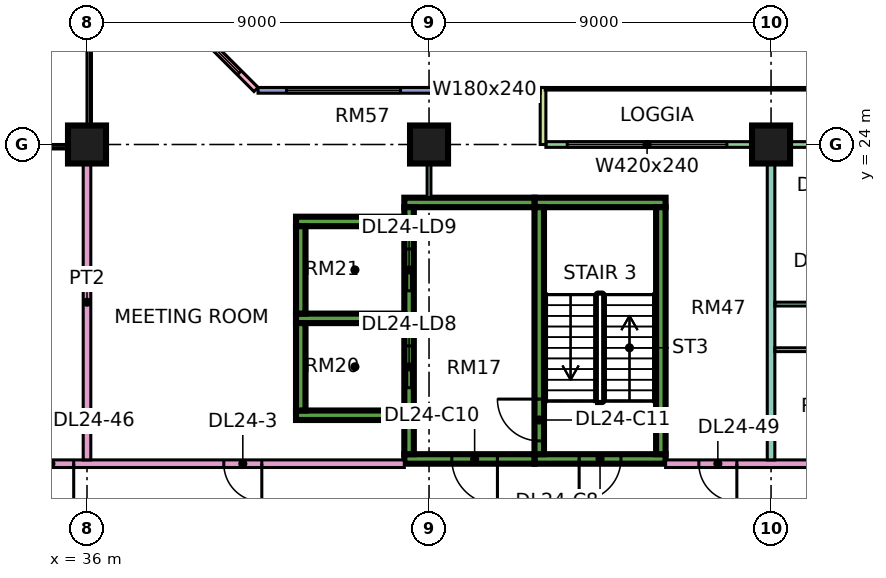
"""IFC4 building model, lengths in metres.
Left out: names, types, materials, properties, quantities, classifications, styles, units other than length and angle.
Written with IfcOpenShell. Run it as: python <this file> out.ifc"""

import sys

from ifc_helpers import new_model, si_unit, direction, frame, frame_2d, origin, origin_2d, place, context, subcontext, project, spatial, rectangle, extrude, element, fill, save


model = new_model("IFC4")
c1 = context("Model", 3, precision=1e-05, world=origin(), true_north=direction((0.0, 1.0)))
c2 = subcontext(c1, "Body", "Model", "MODEL_VIEW")
j1 = project(units=[si_unit("LENGTHUNIT", "METRE"), si_unit("PLANEANGLEUNIT", "RADIAN")], contexts=[c1])
p1 = place(None, origin())
s1 = spatial("IfcSite", under=j1, at=p1, CompositionType="ELEMENT")
p2 = place(p1, origin())
s2 = spatial("IfcBuilding", under=s1, at=p2, CompositionType="ELEMENT")
p3 = place(p2, frame((0.0, 0.0, 106.9)))
s3 = spatial("IfcBuildingStorey", under=s2, at=p3, CompositionType="ELEMENT", Elevation=106.9)
for number, where, z_axis, x_axis in (
    (1, (36.0, 24.0, 0.0), (0.0, 0.0, 1.0), (1.0, 0.0, 0.0)),
    (2, (45.0, 24.0, 0.0), (0.0, 0.0, 1.0), (1.0, 0.0, 0.0)),
    (3, (54.0, 24.0, 0.0), (0.0, 0.0, 1.0), (1.0, 0.0, 0.0)),
):
    element("IfcColumn", number, at=place(p3, frame(where, z_axis=z_axis, x_axis=x_axis)), inside=s3, PredefinedType="COLUMN", context=c2, shape_type="SweptSolid", body=[
        extrude(rectangle(XDim=1.0, YDim=1.0, at=origin_2d()), origin(), (0.0, 0.0, 1.0), 3.75),
    ])
p4 = place(p3, frame((47.775, 15.725, 0.0), z_axis=(0.0, 0.0, 1.0), x_axis=(1.0, 0.0, 0.0)))
e4 = element("IfcWall", 4, at=p4, inside=s3, PredefinedType="SHEAR", context=c2, shape_type="SweptSolid", body=[
    extrude(rectangle(XDim=3.45, YDim=0.25, at=frame_2d((1.725, 0.0))), origin(), (0.0, 0.0, 1.0), 3.75),
])
p5 = place(p4, frame((1.175, 0.0, 0.0)))
e5 = element("IfcOpeningElement", 5, at=p5, cuts=e4, PredefinedType="OPENING", context=c2, shape_type="SweptSolid", body=[
    extrude(rectangle(XDim=1.1, YDim=2.2, at=frame_2d((0.55, 1.1))), frame((0.0, 0.135, 0.0), z_axis=(0.0, -1.0, 0.0), x_axis=(1.0, 0.0, 0.0)), (0.0, 0.0, 1.0), 0.27),
])
p6 = place(p3, frame((47.775, 22.475, 0.0), z_axis=(0.0, 0.0, 1.0), x_axis=(1.0, 0.0, 0.0)))
e6 = element("IfcWall", 6, at=p6, inside=s3, PredefinedType="SHEAR", context=c2, shape_type="SweptSolid", body=[
    extrude(rectangle(XDim=3.45, YDim=0.25, at=frame_2d((1.725, 0.0))), origin(), (0.0, 0.0, 1.0), 3.75),
])
p7 = place(p3, frame((47.9, 15.85, 0.0), z_axis=(0.0, 0.0, 1.0), x_axis=(0.0, 1.0, 0.0)))
e7 = element("IfcWall", 7, at=p7, inside=s3, PredefinedType="SHEAR", context=c2, shape_type="SweptSolid", body=[
    extrude(rectangle(XDim=6.5, YDim=0.25, at=frame_2d((3.25, 0.0))), origin(), (0.0, 0.0, 1.0), 3.75),
])
p8 = place(p7, frame((0.35, 0.0, 0.0)))
e8 = element("IfcOpeningElement", 8, at=p8, cuts=e7, PredefinedType="OPENING", context=c2, shape_type="SweptSolid", body=[
    extrude(rectangle(XDim=1.1, YDim=2.2, at=frame_2d((0.55, 1.1))), frame((0.0, 0.135, 0.0), z_axis=(0.0, -1.0, 0.0), x_axis=(1.0, 0.0, 0.0)), (0.0, 0.0, 1.0), 0.27),
])
p9 = place(p3, frame((51.1, 15.85, 0.0), z_axis=(0.0, 0.0, 1.0), x_axis=(0.0, 1.0, 0.0)))
e9 = element("IfcWall", 9, at=p9, inside=s3, PredefinedType="SHEAR", context=c2, shape_type="SweptSolid", body=[
    extrude(rectangle(XDim=6.5, YDim=0.25, at=frame_2d((3.25, 0.0))), origin(), (0.0, 0.0, 1.0), 3.75),
])
p10 = place(p3, frame((44.35, 15.725, 0.0), z_axis=(0.0, 0.0, 1.0), x_axis=(1.0, 0.0, 0.0)))
e10 = element("IfcWall", 10, at=p10, inside=s3, PredefinedType="SHEAR", context=c2, shape_type="SweptSolid", body=[
    extrude(rectangle(XDim=3.425, YDim=0.25, at=frame_2d((1.712, 0.0))), origin(), (0.0, 0.0, 1.0), 3.75),
])
p11 = place(p10, frame((1.25, 0.0, 0.0)))
e11 = element("IfcOpeningElement", 11, at=p11, cuts=e10, PredefinedType="OPENING", context=c2, shape_type="SweptSolid", body=[
    extrude(rectangle(XDim=1.2, YDim=2.2, at=frame_2d((0.6, 1.1))), frame((0.0, 0.135, 0.0), z_axis=(0.0, -1.0, 0.0), x_axis=(1.0, 0.0, 0.0)), (0.0, 0.0, 1.0), 0.27),
])
p12 = place(p3, frame((44.35, 22.475, 0.0), z_axis=(0.0, 0.0, 1.0), x_axis=(1.0, 0.0, 0.0)))
e12 = element("IfcWall", 12, at=p12, inside=s3, PredefinedType="SHEAR", context=c2, shape_type="SweptSolid", body=[
    extrude(rectangle(XDim=3.425, YDim=0.25, at=frame_2d((1.712, 0.0))), origin(), (0.0, 0.0, 1.0), 3.75),
])
p13 = place(p3, frame((44.475, 15.85, 0.0), z_axis=(0.0, 0.0, 1.0), x_axis=(0.0, 1.0, 0.0)))
e13 = element("IfcWall", 13, at=p13, inside=s3, PredefinedType="SHEAR", context=c2, shape_type="SweptSolid", body=[
    extrude(rectangle(XDim=6.5, YDim=0.25, at=frame_2d((3.25, 0.0))), origin(), (0.0, 0.0, 1.0), 3.75),
])
p14 = place(p13, frame((1.75, 0.0, 0.0)))
e14 = element("IfcOpeningElement", 14, at=p14, cuts=e13, PredefinedType="OPENING", context=c2, shape_type="SweptSolid", body=[
    extrude(rectangle(XDim=1.1, YDim=2.2, at=frame_2d((0.55, 1.1))), frame((0.0, 0.135, 0.0), z_axis=(0.0, -1.0, 0.0), x_axis=(1.0, 0.0, 0.0)), (0.0, 0.0, 1.0), 0.27),
])
p15 = place(p13, frame((4.3, 0.0, 0.0)))
e15 = element("IfcOpeningElement", 15, at=p15, cuts=e13, PredefinedType="OPENING", context=c2, shape_type="SweptSolid", body=[
    extrude(rectangle(XDim=1.1, YDim=2.2, at=frame_2d((0.55, 1.1))), frame((0.0, 0.135, 0.0), z_axis=(0.0, -1.0, 0.0), x_axis=(1.0, 0.0, 0.0)), (0.0, 0.0, 1.0), 0.27),
])
for number, where, z_axis, x_axis in (
    (16, (41.5, 16.875, 0.0), (0.0, 0.0, 1.0), (1.0, 0.0, 0.0)),
    (17, (41.5, 19.425, 0.0), (0.0, 0.0, 1.0), (1.0, 0.0, 0.0)),
    (18, (41.5, 21.975, 0.0), (0.0, 0.0, 1.0), (1.0, 0.0, 0.0)),
):
    element("IfcWall", number, at=place(p3, frame(where, z_axis=z_axis, x_axis=x_axis)), inside=s3, PredefinedType="SHEAR", context=c2, shape_type="SweptSolid", body=[
        extrude(rectangle(XDim=2.85, YDim=0.25, at=frame_2d((1.425, 0.0))), origin(), (0.0, 0.0, 1.0), 3.75),
    ])
for number, where, z_axis, x_axis in (
    (19, (41.625, 17.0, 0.0), (0.0, 0.0, 1.0), (0.0, 1.0, 0.0)),
    (20, (41.625, 19.55, 0.0), (0.0, 0.0, 1.0), (0.0, 1.0, 0.0)),
):
    element("IfcWall", number, at=place(p3, frame(where, z_axis=z_axis, x_axis=x_axis)), inside=s3, PredefinedType="SHEAR", context=c2, shape_type="SweptSolid", body=[
        extrude(rectangle(XDim=2.3, YDim=0.25, at=frame_2d((1.15, 0.0))), origin(), (0.0, 0.0, 1.0), 3.75),
    ])
p16 = place(p3, frame((59.925, 24.0, 0.0), z_axis=(0.0, 0.0, 1.0), x_axis=(-1.0, 0.0, 0.0)))
e21 = element("IfcWall", 21, at=p16, inside=s3, PredefinedType="SOLIDWALL", context=c2, shape_type="SweptSolid", body=[
    extrude(rectangle(XDim=11.85, YDim=0.15, at=frame_2d((5.925, 0.0))), origin(), (0.0, 0.0, 1.0), 3.35),
])
p17 = place(p16, frame((0.562, 0.0, 0.45)))
e22 = element("IfcOpeningElement", 22, at=p17, cuts=e21, PredefinedType="OPENING", context=c2, shape_type="SweptSolid", body=[
    extrude(rectangle(XDim=1.8, YDim=2.4, at=frame_2d((0.9, 1.2))), frame((0.0, 0.085, 0.0), z_axis=(0.0, -1.0, 0.0), x_axis=(1.0, 0.0, 0.0)), (0.0, 0.0, 1.0), 0.17),
])
p18 = place(p16, frame((3.525, 0.0, 0.0)))
e23 = element("IfcOpeningElement", 23, at=p18, cuts=e21, PredefinedType="OPENING", context=c2, shape_type="SweptSolid", body=[
    extrude(rectangle(XDim=1.2, YDim=2.4, at=frame_2d((0.6, 1.2))), frame((0.0, 0.085, 0.0), z_axis=(0.0, -1.0, 0.0), x_axis=(1.0, 0.0, 0.0)), (0.0, 0.0, 1.0), 0.17),
])
p19 = place(p16, frame((7.087, 0.0, 0.45)))
e24 = element("IfcOpeningElement", 24, at=p19, cuts=e21, PredefinedType="OPENING", context=c2, shape_type="SweptSolid", body=[
    extrude(rectangle(XDim=4.2, YDim=2.4, at=frame_2d((2.1, 1.2))), frame((0.0, 0.085, 0.0), z_axis=(0.0, -1.0, 0.0), x_axis=(1.0, 0.0, 0.0)), (0.0, 0.0, 1.0), 0.17),
])
p20 = place(p3, frame((48.0, 25.5, 0.0), z_axis=(0.0, 0.0, 1.0), x_axis=(0.0, -1.0, 0.0)))
e25 = element("IfcWall", 25, at=p20, inside=s3, PredefinedType="SOLIDWALL", context=c2, shape_type="SweptSolid", body=[
    extrude(rectangle(XDim=1.5, YDim=0.15, at=frame_2d((0.75, 0.0))), origin(), (0.0, 0.0, 1.0), 3.35),
])
p21 = place(p3, frame((47.925, 25.425, 0.0), z_axis=(0.0, 0.0, 1.0), x_axis=(-1.0, 0.0, 0.0)))
e26 = element("IfcWall", 26, at=p21, inside=s3, PredefinedType="SOLIDWALL", context=c2, shape_type="SweptSolid", body=[
    extrude(rectangle(XDim=7.425, YDim=0.15, at=frame_2d((3.712, 0.0))), origin(), (0.0, 0.0, 1.0), 3.35),
])
p22 = place(p21, frame((0.562, 0.0, 0.45)))
e27 = element("IfcOpeningElement", 27, at=p22, cuts=e26, PredefinedType="OPENING", context=c2, shape_type="SweptSolid", body=[
    extrude(rectangle(XDim=1.8, YDim=2.4, at=frame_2d((0.9, 1.2))), frame((0.0, 0.085, 0.0), z_axis=(0.0, -1.0, 0.0), x_axis=(1.0, 0.0, 0.0)), (0.0, 0.0, 1.0), 0.17),
])
p23 = place(p21, frame((3.675, 0.0, 0.45)))
e28 = element("IfcOpeningElement", 28, at=p23, cuts=e26, PredefinedType="OPENING", context=c2, shape_type="SweptSolid", body=[
    extrude(rectangle(XDim=3.0, YDim=2.4, at=frame_2d((1.5, 1.2))), frame((0.0, 0.085, 0.0), z_axis=(0.0, -1.0, 0.0), x_axis=(1.0, 0.0, 0.0)), (0.0, 0.0, 1.0), 0.17),
])
p24 = place(p3, frame((40.447, 25.447, 0.0), z_axis=(0.0, 0.0, 1.0), x_axis=(-0.707106781187, 0.707106781187, 0.0)))
e29 = element("IfcWall", 29, at=p24, inside=s3, PredefinedType="SOLIDWALL", context=c2, shape_type="SweptSolid", body=[
    extrude(rectangle(XDim=4.243, YDim=0.15, at=frame_2d((2.121, 0.0))), origin(), (0.0, 0.0, 1.0), 3.35),
])
p25 = place(p24, frame((0.621, 0.0, 0.45)))
e30 = element("IfcOpeningElement", 30, at=p25, cuts=e29, PredefinedType="OPENING", context=c2, shape_type="SweptSolid", body=[
    extrude(rectangle(XDim=3.0, YDim=2.4, at=frame_2d((1.5, 1.2))), frame((0.0, 0.085, 0.0), z_axis=(0.0, -1.0, 0.0), x_axis=(1.0, 0.0, 0.0)), (0.0, 0.0, 1.0), 0.17),
])
p26 = place(p3, frame((34.0, 15.6, 0.0), z_axis=(0.0, 0.0, 1.0), x_axis=(1.0, 0.0, 0.0)))
e31 = element("IfcWall", 31, at=p26, inside=s3, PredefinedType="PARTITIONING", context=c2, shape_type="SweptSolid", body=[
    extrude(rectangle(XDim=10.35, YDim=0.2, at=frame_2d((5.175, 0.0))), origin(), (0.0, 0.0, 1.0), 3.35),
])
p27 = place(p26, frame((5.6, 0.0, 0.0)))
e32 = element("IfcOpeningElement", 32, at=p27, cuts=e31, PredefinedType="OPENING", context=c2, shape_type="SweptSolid", body=[
    extrude(rectangle(XDim=1.0, YDim=2.1, at=frame_2d((0.5, 1.05))), frame((0.0, 0.11, 0.0), z_axis=(0.0, -1.0, 0.0), x_axis=(1.0, 0.0, 0.0)), (0.0, 0.0, 1.0), 0.22),
])
p28 = place(p26, frame((0.45, 0.0, 0.0)))
e33 = element("IfcOpeningElement", 33, at=p28, cuts=e31, PredefinedType="OPENING", context=c2, shape_type="SweptSolid", body=[
    extrude(rectangle(XDim=1.2, YDim=2.1, at=frame_2d((0.6, 1.05))), frame((0.0, 0.11, 0.0), z_axis=(0.0, -1.0, 0.0), x_axis=(1.0, 0.0, 0.0)), (0.0, 0.0, 1.0), 0.22),
])
p29 = place(p3, frame((36.0, 15.7, 0.0), z_axis=(0.0, 0.0, 1.0), x_axis=(0.0, 1.0, 0.0)))
e34 = element("IfcWall", 34, at=p29, inside=s3, PredefinedType="PARTITIONING", context=c2, shape_type="SweptSolid", body=[
    extrude(rectangle(XDim=8.3, YDim=0.2, at=frame_2d((4.15, 0.0))), origin(), (0.0, 0.0, 1.0), 3.35),
])
p30 = place(p3, frame((45.0, 22.6, 0.0), z_axis=(0.0, 0.0, 1.0), x_axis=(0.0, 1.0, 0.0)))
e35 = element("IfcWall", 35, at=p30, inside=s3, PredefinedType="PARTITIONING", context=c2, shape_type="SweptSolid", body=[
    extrude(rectangle(XDim=1.4, YDim=0.1, at=frame_2d((0.7, 0.0))), origin(), (0.0, 0.0, 1.0), 3.35),
])
p31 = place(p3, frame((51.225, 15.6, 0.0), z_axis=(0.0, 0.0, 1.0), x_axis=(1.0, 0.0, 0.0)))
e36 = element("IfcWall", 36, at=p31, inside=s3, PredefinedType="PARTITIONING", context=c2, shape_type="SweptSolid", body=[
    extrude(rectangle(XDim=22.125, YDim=0.2, at=frame_2d((11.062, 0.0))), origin(), (0.0, 0.0, 1.0), 3.35),
])
p32 = place(p31, frame((6.725, 0.0, 0.0)))
e37 = element("IfcOpeningElement", 37, at=p32, cuts=e36, PredefinedType="OPENING", context=c2, shape_type="SweptSolid", body=[
    extrude(rectangle(XDim=1.0, YDim=2.1, at=frame_2d((0.5, 1.05))), frame((0.0, 0.11, 0.0), z_axis=(0.0, -1.0, 0.0), x_axis=(1.0, 0.0, 0.0)), (0.0, 0.0, 1.0), 0.22),
])
p33 = place(p31, frame((0.875, 0.0, 0.0)))
e38 = element("IfcOpeningElement", 38, at=p33, cuts=e36, PredefinedType="OPENING", context=c2, shape_type="SweptSolid", body=[
    extrude(rectangle(XDim=1.0, YDim=2.1, at=frame_2d((0.5, 1.05))), frame((0.0, 0.11, 0.0), z_axis=(0.0, -1.0, 0.0), x_axis=(1.0, 0.0, 0.0)), (0.0, 0.0, 1.0), 0.22),
])
p34 = place(p3, frame((54.0, 15.7, 0.0), z_axis=(0.0, 0.0, 1.0), x_axis=(0.0, 1.0, 0.0)))
e39 = element("IfcWall", 39, at=p34, inside=s3, PredefinedType="PARTITIONING", context=c2, shape_type="SweptSolid", body=[
    extrude(rectangle(XDim=8.226, YDim=0.2, at=frame_2d((4.113, 0.0))), origin(), (0.0, 0.0, 1.0), 3.35),
])
p35 = place(p3, frame((54.1, 18.6, 0.0), z_axis=(0.0, 0.0, 1.0), x_axis=(1.0, 0.0, 0.0)))
e40 = element("IfcWall", 40, at=p35, inside=s3, PredefinedType="PARTITIONING", context=c2, shape_type="SweptSolid", body=[
    extrude(rectangle(XDim=2.55, YDim=0.1, at=frame_2d((1.275, 0.0))), origin(), (0.0, 0.0, 1.0), 3.35),
])
p36 = place(p3, frame((54.1, 19.8, 0.0), z_axis=(0.0, 0.0, 1.0), x_axis=(1.0, 0.0, 0.0)))
e41 = element("IfcWall", 41, at=p36, inside=s3, PredefinedType="PARTITIONING", context=c2, shape_type="SweptSolid", body=[
    extrude(rectangle(XDim=8.95, YDim=0.1, at=frame_2d((4.475, 0.0))), origin(), (0.0, 0.0, 1.0), 3.35),
])
p37 = place(p36, frame((0.95, 0.0, 0.0)))
e42 = element("IfcOpeningElement", 42, at=p37, cuts=e41, PredefinedType="OPENING", context=c2, shape_type="SweptSolid", body=[
    extrude(rectangle(XDim=0.9, YDim=2.1, at=frame_2d((0.45, 1.05))), frame((0.0, 0.06, 0.0), z_axis=(0.0, -1.0, 0.0), x_axis=(1.0, 0.0, 0.0)), (0.0, 0.0, 1.0), 0.12),
])
p38 = place(p36, frame((3.95, 0.0, 0.0)))
e43 = element("IfcOpeningElement", 43, at=p38, cuts=e41, PredefinedType="OPENING", context=c2, shape_type="SweptSolid", body=[
    extrude(rectangle(XDim=0.9, YDim=2.1, at=frame_2d((0.45, 1.05))), frame((0.0, 0.06, 0.0), z_axis=(0.0, -1.0, 0.0), x_axis=(1.0, 0.0, 0.0)), (0.0, 0.0, 1.0), 0.12),
])
p39 = place(p19, origin())
e44 = element("IfcWindow", 44, at=p39, inside=s3, PartitioningType="SINGLE_PANEL", PredefinedType="WINDOW", context=c2, shape_type="SweptSolid", body=[
    extrude(rectangle(XDim=4.2, YDim=2.4, at=frame_2d((2.1, 1.2))), frame((0.0, 0.03, 0.0), z_axis=(0.0, -1.0, 0.0), x_axis=(1.0, 0.0, 0.0)), (0.0, 0.0, 1.0), 0.06),
])
fill(e24, e44)
p40 = place(p22, origin())
e45 = element("IfcWindow", 45, at=p40, inside=s3, PartitioningType="SINGLE_PANEL", PredefinedType="WINDOW", context=c2, shape_type="SweptSolid", body=[
    extrude(rectangle(XDim=1.8, YDim=2.4, at=frame_2d((0.9, 1.2))), frame((0.0, 0.03, 0.0), z_axis=(0.0, -1.0, 0.0), x_axis=(1.0, 0.0, 0.0)), (0.0, 0.0, 1.0), 0.06),
])
fill(e27, e45)
p41 = place(p23, origin())
e46 = element("IfcWindow", 46, at=p41, inside=s3, PartitioningType="SINGLE_PANEL", PredefinedType="WINDOW", context=c2, shape_type="SweptSolid", body=[
    extrude(rectangle(XDim=3.0, YDim=2.4, at=frame_2d((1.5, 1.2))), frame((0.0, 0.03, 0.0), z_axis=(0.0, -1.0, 0.0), x_axis=(1.0, 0.0, 0.0)), (0.0, 0.0, 1.0), 0.06),
])
fill(e28, e46)
p42 = place(p25, origin())
e47 = element("IfcWindow", 47, at=p42, inside=s3, PartitioningType="SINGLE_PANEL", PredefinedType="WINDOW", context=c2, shape_type="SweptSolid", body=[
    extrude(rectangle(XDim=3.0, YDim=2.4, at=frame_2d((1.5, 1.2))), frame((0.0, 0.03, 0.0), z_axis=(0.0, -1.0, 0.0), x_axis=(1.0, 0.0, 0.0)), (0.0, 0.0, 1.0), 0.06),
])
fill(e30, e47)
p43 = place(p5, frame((1.1, 0.0, 0.0), z_axis=(0.0, 0.0, 1.0), x_axis=(-1.0, 0.0, 0.0)))
e48 = element("IfcDoor", 48, at=p43, inside=s3, OperationType="SINGLE_SWING_LEFT", PredefinedType="DOOR", context=c2, shape_type="SweptSolid", body=[
    extrude(rectangle(XDim=1.1, YDim=2.2, at=frame_2d((0.55, 1.1))), frame((0.0, 0.025, 0.0), z_axis=(0.0, -1.0, 0.0), x_axis=(1.0, 0.0, 0.0)), (0.0, 0.0, 1.0), 0.05),
])
fill(e5, e48)
p44 = place(p11, origin())
e49 = element("IfcDoor", 49, at=p44, inside=s3, OperationType="SINGLE_SWING_RIGHT", PredefinedType="DOOR", context=c2, shape_type="SweptSolid", body=[
    extrude(rectangle(XDim=1.2, YDim=2.2, at=frame_2d((0.6, 1.1))), frame((0.0, 0.025, 0.0), z_axis=(0.0, -1.0, 0.0), x_axis=(1.0, 0.0, 0.0)), (0.0, 0.0, 1.0), 0.05),
])
fill(e11, e49)
p45 = place(p8, frame((1.1, 0.0, 0.0), z_axis=(0.0, 0.0, 1.0), x_axis=(-1.0, 0.0, 0.0)))
e50 = element("IfcDoor", 50, at=p45, inside=s3, OperationType="SINGLE_SWING_RIGHT", PredefinedType="DOOR", context=c2, shape_type="SweptSolid", body=[
    extrude(rectangle(XDim=1.1, YDim=2.2, at=frame_2d((0.55, 1.1))), frame((0.0, 0.025, 0.0), z_axis=(0.0, -1.0, 0.0), x_axis=(1.0, 0.0, 0.0)), (0.0, 0.0, 1.0), 0.05),
])
fill(e8, e50)
p46 = place(p14, origin())
e51 = element("IfcDoor", 51, at=p46, inside=s3, OperationType="DOUBLE_DOOR_SLIDING", PredefinedType="DOOR", context=c2, shape_type="SweptSolid", body=[
    extrude(rectangle(XDim=1.1, YDim=2.2, at=frame_2d((0.55, 1.1))), frame((0.0, 0.025, 0.0), z_axis=(0.0, -1.0, 0.0), x_axis=(1.0, 0.0, 0.0)), (0.0, 0.0, 1.0), 0.05),
])
fill(e14, e51)
p47 = place(p15, origin())
e52 = element("IfcDoor", 52, at=p47, inside=s3, OperationType="DOUBLE_DOOR_SLIDING", PredefinedType="DOOR", context=c2, shape_type="SweptSolid", body=[
    extrude(rectangle(XDim=1.1, YDim=2.2, at=frame_2d((0.55, 1.1))), frame((0.0, 0.025, 0.0), z_axis=(0.0, -1.0, 0.0), x_axis=(1.0, 0.0, 0.0)), (0.0, 0.0, 1.0), 0.05),
])
fill(e15, e52)
p48 = place(p27, origin())
e53 = element("IfcDoor", 53, at=p48, inside=s3, OperationType="SINGLE_SWING_RIGHT", PredefinedType="DOOR", context=c2, shape_type="SweptSolid", body=[
    extrude(rectangle(XDim=1.0, YDim=2.1, at=frame_2d((0.5, 1.05))), frame((0.0, 0.025, 0.0), z_axis=(0.0, -1.0, 0.0), x_axis=(1.0, 0.0, 0.0)), (0.0, 0.0, 1.0), 0.05),
])
fill(e32, e53)
p49 = place(p28, origin())
e54 = element("IfcDoor", 54, at=p49, inside=s3, OperationType="SINGLE_SWING_RIGHT", PredefinedType="DOOR", context=c2, shape_type="SweptSolid", body=[
    extrude(rectangle(XDim=1.2, YDim=2.1, at=frame_2d((0.6, 1.05))), frame((0.0, 0.025, 0.0), z_axis=(0.0, -1.0, 0.0), x_axis=(1.0, 0.0, 0.0)), (0.0, 0.0, 1.0), 0.05),
])
fill(e33, e54)
p50 = place(p33, origin())
e55 = element("IfcDoor", 55, at=p50, inside=s3, OperationType="SINGLE_SWING_RIGHT", PredefinedType="DOOR", context=c2, shape_type="SweptSolid", body=[
    extrude(rectangle(XDim=1.0, YDim=2.1, at=frame_2d((0.5, 1.05))), frame((0.0, 0.025, 0.0), z_axis=(0.0, -1.0, 0.0), x_axis=(1.0, 0.0, 0.0)), (0.0, 0.0, 1.0), 0.05),
])
fill(e38, e55)
save(model, sys.argv[1])
